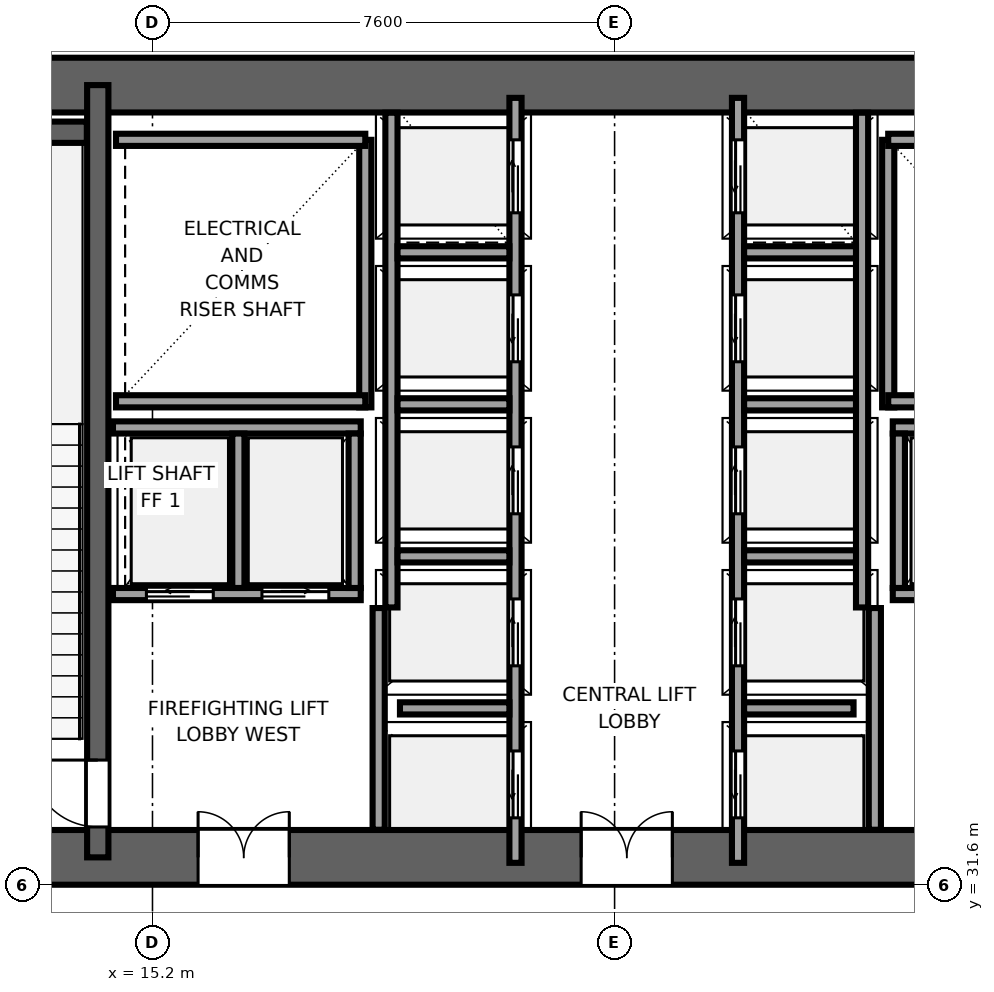
"""IFC4 building model, lengths in metres.
Left out: names, types, materials, properties, quantities, classifications, styles, units other than length and angle.
Written with IfcOpenShell. Run it as: python <this file> out.ifc"""

import sys

from ifc_helpers import new_model, si_unit, direction, frame, frame_2d, origin, place, context, subcontext, project, spatial, rectangle, extrude, source, transform, mapped, element, fill, save


model = new_model("IFC4")
c1 = context("Model", 3, precision=1e-05, world=origin(), true_north=direction((0.0, 1.0)))
c2 = subcontext(c1, "Body", "Model", "MODEL_VIEW")
j1 = project(units=[si_unit("LENGTHUNIT", "METRE"), si_unit("PLANEANGLEUNIT", "RADIAN")], contexts=[c1])
p1 = place(None, origin())
s1 = spatial("IfcSite", under=j1, at=p1, CompositionType="ELEMENT")
p2 = place(p1, origin())
s2 = spatial("IfcBuilding", under=s1, at=p2, CompositionType="ELEMENT")
p3 = place(p2, origin())
s3 = spatial("IfcBuildingStorey", under=s2, at=p3, CompositionType="ELEMENT", Elevation=0.0)
p4 = place(p3, frame((9.6, 32.05, 0.0), z_axis=(0.0, 0.0, 1.0), x_axis=(1.0, 0.0, 0.0)))
e1 = element("IfcWall", 1, at=p4, inside=s3, PredefinedType="SHEAR", context=c2, shape_type="SweptSolid", body=[
    extrude(rectangle(XDim=26.8, YDim=0.9, at=frame_2d((13.4, 0.0))), origin(), (0.0, 0.0, 1.0), 6.0),
])
p5 = place(p4, frame((7.85, 0.0, 0.0), z_axis=(0.0, 0.0, 1.0), x_axis=(-1.0, 0.0, 0.0)))
e2 = element("IfcOpeningElement", 2, at=p5, cuts=e1, PredefinedType="OPENING", context=c2, shape_type="SweptSolid", body=[
    extrude(rectangle(XDim=1.5, YDim=2.04, at=frame_2d((0.75, 1.02))), frame((0.0, 0.46, 0.0), z_axis=(0.0, -1.0, 0.0), x_axis=(1.0, 0.0, 0.0)), (0.0, 0.0, 1.0), 0.92),
])
p6 = place(p4, frame((14.15, 0.0, 0.0), z_axis=(0.0, 0.0, 1.0), x_axis=(-1.0, 0.0, 0.0)))
e3 = element("IfcOpeningElement", 3, at=p6, cuts=e1, PredefinedType="OPENING", context=c2, shape_type="SweptSolid", body=[
    extrude(rectangle(XDim=1.5, YDim=2.04, at=frame_2d((0.75, 1.02))), frame((0.0, 0.46, 0.0), z_axis=(0.0, -1.0, 0.0), x_axis=(1.0, 0.0, 0.0)), (0.0, 0.0, 1.0), 0.92),
])
p7 = place(p4, frame((20.45, 0.0, 0.0), z_axis=(0.0, 0.0, 1.0), x_axis=(-1.0, 0.0, 0.0)))
e4 = element("IfcOpeningElement", 4, at=p7, cuts=e1, PredefinedType="OPENING", context=c2, shape_type="SweptSolid", body=[
    extrude(rectangle(XDim=1.5, YDim=2.04, at=frame_2d((0.75, 1.02))), frame((0.0, 0.46, 0.0), z_axis=(0.0, -1.0, 0.0), x_axis=(1.0, 0.0, 0.0)), (0.0, 0.0, 1.0), 0.92),
])
p8 = place(p3, frame((9.6, 44.75, 0.0), z_axis=(0.0, 0.0, 1.0), x_axis=(1.0, 0.0, 0.0)))
e5 = element("IfcWall", 5, at=p8, inside=s3, PredefinedType="SHEAR", context=c2, shape_type="SweptSolid", body=[
    extrude(rectangle(XDim=26.8, YDim=0.9, at=frame_2d((13.4, 0.0))), origin(), (0.0, 0.0, 1.0), 6.0),
])
p9 = place(p3, frame((14.3, 32.05, 0.0), z_axis=(0.0, 0.0, 1.0), x_axis=(0.0, 1.0, 0.0)))
e6 = element("IfcWall", 6, at=p9, inside=s3, PredefinedType="SHEAR", context=c2, shape_type="SweptSolid", body=[
    extrude(rectangle(XDim=12.7, YDim=0.35, at=frame_2d((6.35, 0.0))), origin(), (0.0, 0.0, 1.0), 6.0),
])
p10 = place(p9, frame((1.6, 0.0, 0.0), z_axis=(0.0, 0.0, 1.0), x_axis=(-1.0, 0.0, 0.0)))
e7 = element("IfcOpeningElement", 7, at=p10, cuts=e6, PredefinedType="OPENING", context=c2, shape_type="SweptSolid", body=[
    extrude(rectangle(XDim=1.1, YDim=2.12, at=frame_2d((0.55, 1.06))), frame((0.0, 0.185, 0.0), z_axis=(0.0, -1.0, 0.0), x_axis=(1.0, 0.0, 0.0)), (0.0, 0.0, 1.0), 0.37),
])
p11 = place(p3, frame((10.52, 43.975, 0.0), z_axis=(0.0, 0.0, 1.0), x_axis=(1.0, 0.0, 0.0)))
e8 = element("IfcWall", 8, at=p11, inside=s3, PredefinedType="SHEAR", context=c2, shape_type="SweptSolid", body=[
    extrude(rectangle(XDim=3.6, YDim=0.35, at=frame_2d((1.8, 0.0))), origin(), (0.0, 0.0, 1.0), 6.0),
])
p12 = place(p3, frame((18.7, 39.45, 0.0), z_axis=(0.0, 0.0, 1.0), x_axis=(0.0, 1.0, 0.0)))
e9 = element("IfcWall", 9, at=p12, inside=s3, PredefinedType="SOLIDWALL", context=c2, shape_type="SweptSolid", body=[
    extrude(rectangle(XDim=4.4, YDim=0.2, at=frame_2d((2.2, 0.0))), origin(), (0.0, 0.0, 1.0), 5.74),
])
for number, where, z_axis, x_axis in (
    (10, (14.6, 39.55, 0.0), (0.0, 0.0, 1.0), (1.0, 0.0, 0.0)),
    (11, (14.6, 43.85, 0.0), (0.0, 0.0, 1.0), (1.0, 0.0, 0.0)),
):
    element("IfcWall", number, at=place(p3, frame(where, z_axis=z_axis, x_axis=x_axis)), inside=s3, PredefinedType="SOLIDWALL", context=c2, shape_type="SweptSolid", body=[
        extrude(rectangle(XDim=4.1, YDim=0.2, at=frame_2d((2.05, 0.0))), origin(), (0.0, 0.0, 1.0), 5.74),
    ])
p13 = place(p3, frame((27.3, 39.45, 0.0), z_axis=(0.0, 0.0, 1.0), x_axis=(0.0, 1.0, 0.0)))
e12 = element("IfcWall", 12, at=p13, inside=s3, PredefinedType="SOLIDWALL", context=c2, shape_type="SweptSolid", body=[
    extrude(rectangle(XDim=4.4, YDim=0.2, at=frame_2d((2.2, 0.0))), origin(), (0.0, 0.0, 1.0), 5.74),
])
for number, where, z_axis, x_axis in (
    (13, (27.3, 39.55, 0.0), (0.0, 0.0, 1.0), (1.0, 0.0, 0.0)),
    (14, (27.3, 43.85, 0.0), (0.0, 0.0, 1.0), (1.0, 0.0, 0.0)),
):
    element("IfcWall", number, at=place(p3, frame(where, z_axis=z_axis, x_axis=x_axis)), inside=s3, PredefinedType="SOLIDWALL", context=c2, shape_type="SweptSolid", body=[
        extrude(rectangle(XDim=4.1, YDim=0.2, at=frame_2d((2.05, 0.0))), origin(), (0.0, 0.0, 1.0), 5.74),
    ])
for number, where, z_axis, x_axis in (
    (15, (18.92, 32.504, 0.0), (0.0, 0.0, 1.0), (0.0, 1.0, 0.0)),
    (16, (27.08, 32.504, 0.0), (0.0, 0.0, 1.0), (0.0, 1.0, 0.0)),
):
    element("IfcWall", number, at=place(p3, frame(where, z_axis=z_axis, x_axis=x_axis)), inside=s3, PredefinedType="SOLIDWALL", context=c2, shape_type="SweptSolid", body=[
        extrude(rectangle(XDim=3.646, YDim=0.2, at=frame_2d((1.823, 0.0))), origin(), (0.0, 0.0, 1.0), 5.74),
    ])
p14 = place(p3, frame((21.17, 31.96, 0.0), z_axis=(0.0, 0.0, 1.0), x_axis=(0.0, 1.0, 0.0)))
e17 = element("IfcWall", 17, at=p14, inside=s3, PredefinedType="SOLIDWALL", context=c2, shape_type="SweptSolid", body=[
    extrude(rectangle(XDim=12.58, YDim=0.2, at=frame_2d((6.29, 0.0))), origin(), (0.0, 0.0, 1.0), 5.74),
])
p15 = place(p14, frame((0.74, 0.0, 0.0)))
e18 = element("IfcOpeningElement", 18, at=p15, cuts=e17, PredefinedType="OPENING", context=c2, shape_type="SweptSolid", body=[
    extrude(rectangle(XDim=1.1, YDim=2.12, at=frame_2d((0.55, 1.06))), frame((0.0, 0.11, 0.0), z_axis=(0.0, -1.0, 0.0), x_axis=(1.0, 0.0, 0.0)), (0.0, 0.0, 1.0), 0.22),
])
p16 = place(p14, frame((3.24, 0.0, 0.0)))
e19 = element("IfcOpeningElement", 19, at=p16, cuts=e17, PredefinedType="OPENING", context=c2, shape_type="SweptSolid", body=[
    extrude(rectangle(XDim=1.1, YDim=2.12, at=frame_2d((0.55, 1.06))), frame((0.0, 0.11, 0.0), z_axis=(0.0, -1.0, 0.0), x_axis=(1.0, 0.0, 0.0)), (0.0, 0.0, 1.0), 0.22),
])
p17 = place(p14, frame((5.74, 0.0, 0.0)))
e20 = element("IfcOpeningElement", 20, at=p17, cuts=e17, PredefinedType="OPENING", context=c2, shape_type="SweptSolid", body=[
    extrude(rectangle(XDim=1.1, YDim=2.12, at=frame_2d((0.55, 1.06))), frame((0.0, 0.11, 0.0), z_axis=(0.0, -1.0, 0.0), x_axis=(1.0, 0.0, 0.0)), (0.0, 0.0, 1.0), 0.22),
])
p18 = place(p14, frame((8.24, 0.0, 0.0)))
e21 = element("IfcOpeningElement", 21, at=p18, cuts=e17, PredefinedType="OPENING", context=c2, shape_type="SweptSolid", body=[
    extrude(rectangle(XDim=1.1, YDim=2.12, at=frame_2d((0.55, 1.06))), frame((0.0, 0.11, 0.0), z_axis=(0.0, -1.0, 0.0), x_axis=(1.0, 0.0, 0.0)), (0.0, 0.0, 1.0), 0.22),
])
p19 = place(p14, frame((10.69, 0.0, 0.0)))
e22 = element("IfcOpeningElement", 22, at=p19, cuts=e17, PredefinedType="OPENING", context=c2, shape_type="SweptSolid", body=[
    extrude(rectangle(XDim=1.2, YDim=2.15, at=frame_2d((0.6, 1.075))), frame((0.0, 0.11, 0.0), z_axis=(0.0, -1.0, 0.0), x_axis=(1.0, 0.0, 0.0)), (0.0, 0.0, 1.0), 0.22),
])
p20 = place(p3, frame((19.13, 36.16, 0.0), z_axis=(0.0, 0.0, 1.0), x_axis=(0.0, 1.0, 0.0)))
e23 = element("IfcWall", 23, at=p20, inside=s3, PredefinedType="SOLIDWALL", context=c2, shape_type="SweptSolid", body=[
    extrude(rectangle(XDim=8.136, YDim=0.2, at=frame_2d((4.068, 0.0))), origin(), (0.0, 0.0, 1.0), 5.74),
])
p21 = place(p3, frame((19.27, 34.5, 0.0), z_axis=(0.0, 0.0, 1.0), x_axis=(1.0, 0.0, 0.0)))
e24 = element("IfcWall", 24, at=p21, inside=s3, PredefinedType="SOLIDWALL", context=c2, shape_type="SweptSolid", body=[
    extrude(rectangle(XDim=1.8, YDim=0.2, at=frame_2d((0.9, 0.0))), origin(), (0.0, 0.0, 1.0), 5.74),
])
for number, where, z_axis, x_axis in (
    (25, (19.23, 37.0, 0.0), (0.0, 0.0, 1.0), (1.0, 0.0, 0.0)),
    (26, (19.23, 39.5, 0.0), (0.0, 0.0, 1.0), (1.0, 0.0, 0.0)),
    (27, (19.23, 42.0, 0.0), (0.0, 0.0, 1.0), (1.0, 0.0, 0.0)),
):
    element("IfcWall", number, at=place(p3, frame(where, z_axis=z_axis, x_axis=x_axis)), inside=s3, PredefinedType="SOLIDWALL", context=c2, shape_type="SweptSolid", body=[
        extrude(rectangle(XDim=1.84, YDim=0.2, at=frame_2d((0.92, 0.0))), origin(), (0.0, 0.0, 1.0), 5.74),
    ])
p22 = place(p3, frame((27.375, 36.38, 0.0), z_axis=(0.0, 0.0, 1.0), x_axis=(1.0, 0.0, 0.0)))
e28 = element("IfcWall", 28, at=p22, inside=s3, PredefinedType="SOLIDWALL", context=c2, shape_type="SweptSolid", body=[
    extrude(rectangle(XDim=4.075, YDim=0.2, at=frame_2d((2.038, 0.0))), origin(), (0.0, 0.0, 1.0), 5.74),
])
p23 = place(p22, frame((0.525, 0.0, 0.0)))
e29 = element("IfcOpeningElement", 29, at=p23, cuts=e28, PredefinedType="OPENING", context=c2, shape_type="SweptSolid", body=[
    extrude(rectangle(XDim=1.1, YDim=2.12, at=frame_2d((0.55, 1.06))), frame((0.0, 0.11, 0.0), z_axis=(0.0, -1.0, 0.0), x_axis=(1.0, 0.0, 0.0)), (0.0, 0.0, 1.0), 0.22),
])
p24 = place(p22, frame((2.425, 0.0, 0.0)))
e30 = element("IfcOpeningElement", 30, at=p24, cuts=e28, PredefinedType="OPENING", context=c2, shape_type="SweptSolid", body=[
    extrude(rectangle(XDim=1.1, YDim=2.12, at=frame_2d((0.55, 1.06))), frame((0.0, 0.11, 0.0), z_axis=(0.0, -1.0, 0.0), x_axis=(1.0, 0.0, 0.0)), (0.0, 0.0, 1.0), 0.22),
])
p25 = place(p3, frame((27.375, 39.12, 0.0), z_axis=(0.0, 0.0, 1.0), x_axis=(1.0, 0.0, 0.0)))
e31 = element("IfcWall", 31, at=p25, inside=s3, PredefinedType="SOLIDWALL", context=c2, shape_type="SweptSolid", body=[
    extrude(rectangle(XDim=4.075, YDim=0.2, at=frame_2d((2.038, 0.0))), origin(), (0.0, 0.0, 1.0), 5.74),
])
p26 = place(p3, frame((27.475, 36.48, 0.0), z_axis=(0.0, 0.0, 1.0), x_axis=(0.0, 1.0, 0.0)))
e32 = element("IfcWall", 32, at=p26, inside=s3, PredefinedType="SOLIDWALL", context=c2, shape_type="SweptSolid", body=[
    extrude(rectangle(XDim=2.54, YDim=0.2, at=frame_2d((1.27, 0.0))), origin(), (0.0, 0.0, 1.0), 5.74),
])
p27 = place(p3, frame((14.55, 36.38, 0.0), z_axis=(0.0, 0.0, 1.0), x_axis=(1.0, 0.0, 0.0)))
e33 = element("IfcWall", 33, at=p27, inside=s3, PredefinedType="SOLIDWALL", context=c2, shape_type="SweptSolid", body=[
    extrude(rectangle(XDim=4.075, YDim=0.2, at=frame_2d((2.038, 0.0))), origin(), (0.0, 0.0, 1.0), 5.74),
])
p28 = place(p27, frame((0.55, 0.0, 0.0)))
e34 = element("IfcOpeningElement", 34, at=p28, cuts=e33, PredefinedType="OPENING", context=c2, shape_type="SweptSolid", body=[
    extrude(rectangle(XDim=1.1, YDim=2.12, at=frame_2d((0.55, 1.06))), frame((0.0, 0.11, 0.0), z_axis=(0.0, -1.0, 0.0), x_axis=(1.0, 0.0, 0.0)), (0.0, 0.0, 1.0), 0.22),
])
p29 = place(p27, frame((2.45, 0.0, 0.0)))
e35 = element("IfcOpeningElement", 35, at=p29, cuts=e33, PredefinedType="OPENING", context=c2, shape_type="SweptSolid", body=[
    extrude(rectangle(XDim=1.1, YDim=2.12, at=frame_2d((0.55, 1.06))), frame((0.0, 0.11, 0.0), z_axis=(0.0, -1.0, 0.0), x_axis=(1.0, 0.0, 0.0)), (0.0, 0.0, 1.0), 0.22),
])
p30 = place(p3, frame((14.55, 39.12, 0.0), z_axis=(0.0, 0.0, 1.0), x_axis=(1.0, 0.0, 0.0)))
e36 = element("IfcWall", 36, at=p30, inside=s3, PredefinedType="SOLIDWALL", context=c2, shape_type="SweptSolid", body=[
    extrude(rectangle(XDim=4.075, YDim=0.2, at=frame_2d((2.038, 0.0))), origin(), (0.0, 0.0, 1.0), 5.74),
])
for number, where, z_axis, x_axis in (
    (37, (18.525, 36.48, 0.0), (0.0, 0.0, 1.0), (0.0, 1.0, 0.0)),
    (38, (16.613, 36.48, 0.0), (0.0, 0.0, 1.0), (0.0, 1.0, 0.0)),
):
    element("IfcWall", number, at=place(p3, frame(where, z_axis=z_axis, x_axis=x_axis)), inside=s3, PredefinedType="SOLIDWALL", context=c2, shape_type="SweptSolid", body=[
        extrude(rectangle(XDim=2.54, YDim=0.2, at=frame_2d((1.27, 0.0))), origin(), (0.0, 0.0, 1.0), 5.74),
    ])
p31 = place(p3, frame((24.83, 31.96, 0.0), z_axis=(0.0, 0.0, 1.0), x_axis=(0.0, 1.0, 0.0)))
e39 = element("IfcWall", 39, at=p31, inside=s3, PredefinedType="SOLIDWALL", context=c2, shape_type="SweptSolid", body=[
    extrude(rectangle(XDim=12.58, YDim=0.2, at=frame_2d((6.29, 0.0))), origin(), (0.0, 0.0, 1.0), 5.74),
])
p32 = place(p31, frame((0.74, 0.0, 0.0)))
e40 = element("IfcOpeningElement", 40, at=p32, cuts=e39, PredefinedType="OPENING", context=c2, shape_type="SweptSolid", body=[
    extrude(rectangle(XDim=1.1, YDim=2.12, at=frame_2d((0.55, 1.06))), frame((0.0, 0.11, 0.0), z_axis=(0.0, -1.0, 0.0), x_axis=(1.0, 0.0, 0.0)), (0.0, 0.0, 1.0), 0.22),
])
p33 = place(p31, frame((3.24, 0.0, 0.0)))
e41 = element("IfcOpeningElement", 41, at=p33, cuts=e39, PredefinedType="OPENING", context=c2, shape_type="SweptSolid", body=[
    extrude(rectangle(XDim=1.1, YDim=2.12, at=frame_2d((0.55, 1.06))), frame((0.0, 0.11, 0.0), z_axis=(0.0, -1.0, 0.0), x_axis=(1.0, 0.0, 0.0)), (0.0, 0.0, 1.0), 0.22),
])
p34 = place(p31, frame((5.74, 0.0, 0.0)))
e42 = element("IfcOpeningElement", 42, at=p34, cuts=e39, PredefinedType="OPENING", context=c2, shape_type="SweptSolid", body=[
    extrude(rectangle(XDim=1.1, YDim=2.12, at=frame_2d((0.55, 1.06))), frame((0.0, 0.11, 0.0), z_axis=(0.0, -1.0, 0.0), x_axis=(1.0, 0.0, 0.0)), (0.0, 0.0, 1.0), 0.22),
])
p35 = place(p31, frame((8.24, 0.0, 0.0)))
e43 = element("IfcOpeningElement", 43, at=p35, cuts=e39, PredefinedType="OPENING", context=c2, shape_type="SweptSolid", body=[
    extrude(rectangle(XDim=1.1, YDim=2.12, at=frame_2d((0.55, 1.06))), frame((0.0, 0.11, 0.0), z_axis=(0.0, -1.0, 0.0), x_axis=(1.0, 0.0, 0.0)), (0.0, 0.0, 1.0), 0.22),
])
p36 = place(p31, frame((10.69, 0.0, 0.0)))
e44 = element("IfcOpeningElement", 44, at=p36, cuts=e39, PredefinedType="OPENING", context=c2, shape_type="SweptSolid", body=[
    extrude(rectangle(XDim=1.2, YDim=2.15, at=frame_2d((0.6, 1.075))), frame((0.0, 0.11, 0.0), z_axis=(0.0, -1.0, 0.0), x_axis=(1.0, 0.0, 0.0)), (0.0, 0.0, 1.0), 0.22),
])
p37 = place(p3, frame((26.87, 36.16, 0.0), z_axis=(0.0, 0.0, 1.0), x_axis=(0.0, 1.0, 0.0)))
e45 = element("IfcWall", 45, at=p37, inside=s3, PredefinedType="SOLIDWALL", context=c2, shape_type="SweptSolid", body=[
    extrude(rectangle(XDim=8.136, YDim=0.2, at=frame_2d((4.068, 0.0))), origin(), (0.0, 0.0, 1.0), 5.74),
])
p38 = place(p3, frame((24.93, 34.5, 0.0), z_axis=(0.0, 0.0, 1.0), x_axis=(1.0, 0.0, 0.0)))
e46 = element("IfcWall", 46, at=p38, inside=s3, PredefinedType="SOLIDWALL", context=c2, shape_type="SweptSolid", body=[
    extrude(rectangle(XDim=1.8, YDim=0.2, at=frame_2d((0.9, 0.0))), origin(), (0.0, 0.0, 1.0), 5.74),
])
for number, where, z_axis, x_axis in (
    (47, (24.93, 37.0, 0.0), (0.0, 0.0, 1.0), (1.0, 0.0, 0.0)),
    (48, (24.93, 39.5, 0.0), (0.0, 0.0, 1.0), (1.0, 0.0, 0.0)),
    (49, (24.93, 42.0, 0.0), (0.0, 0.0, 1.0), (1.0, 0.0, 0.0)),
):
    element("IfcWall", number, at=place(p3, frame(where, z_axis=z_axis, x_axis=x_axis)), inside=s3, PredefinedType="SOLIDWALL", context=c2, shape_type="SweptSolid", body=[
        extrude(rectangle(XDim=1.84, YDim=0.2, at=frame_2d((0.92, 0.0))), origin(), (0.0, 0.0, 1.0), 5.74),
    ])
m1 = source(origin(), c2, "Body", "SweptSolid", [
    extrude(rectangle(XDim=1.1, YDim=2.12, at=frame_2d((0.55, 1.06))), frame((0.0, 0.025, 0.0), z_axis=(0.0, -1.0, 0.0), x_axis=(1.0, 0.0, 0.0)), (0.0, 0.0, 1.0), 0.05),
])
p39 = place(p10, origin())
e50 = element("IfcDoor", 50, at=p39, inside=s3, OperationType="SINGLE_SWING_RIGHT", PredefinedType="DOOR", context=c2, shape_type="MappedRepresentation", body=[
    mapped(m1, transform((0.0, 0.0, 0.0), x_axis=(1.0, 0.0, 0.0), y_axis=(0.0, 1.0, 0.0), z_axis=(0.0, 0.0, 1.0), scale=1.0)),
])
fill(e7, e50)
m2 = source(origin(), c2, "Body", "SweptSolid", [
    extrude(rectangle(XDim=1.5, YDim=2.04, at=frame_2d((0.75, 1.02))), frame((0.0, 0.025, 0.0), z_axis=(0.0, -1.0, 0.0), x_axis=(1.0, 0.0, 0.0)), (0.0, 0.0, 1.0), 0.05),
])
p40 = place(p5, origin())
e51 = element("IfcDoor", 51, at=p40, inside=s3, OperationType="DOUBLE_DOOR_SINGLE_SWING", PredefinedType="DOOR", context=c2, shape_type="MappedRepresentation", body=[
    mapped(m2, transform((0.0, 0.0, 0.0), x_axis=(1.0, 0.0, 0.0), y_axis=(0.0, 1.0, 0.0), z_axis=(0.0, 0.0, 1.0), scale=1.0)),
])
fill(e2, e51)
p41 = place(p6, origin())
e52 = element("IfcDoor", 52, at=p41, inside=s3, OperationType="DOUBLE_DOOR_SINGLE_SWING", PredefinedType="DOOR", context=c2, shape_type="MappedRepresentation", body=[
    mapped(m2, transform((0.0, 0.0, 0.0), x_axis=(1.0, 0.0, 0.0), y_axis=(0.0, 1.0, 0.0), z_axis=(0.0, 0.0, 1.0), scale=1.0)),
])
fill(e3, e52)
m3 = source(origin(), c2, "Body", "SweptSolid", [
    extrude(rectangle(XDim=1.1, YDim=2.12, at=frame_2d((0.55, 1.06))), frame((0.0, 0.025, 0.0), z_axis=(0.0, -1.0, 0.0), x_axis=(1.0, 0.0, 0.0)), (0.0, 0.0, 1.0), 0.05),
])
p42 = place(p15, origin())
e53 = element("IfcDoor", 53, at=p42, inside=s3, OperationType="SLIDING_TO_LEFT", PredefinedType="DOOR", context=c2, shape_type="MappedRepresentation", body=[
    mapped(m3, transform((0.0, 0.0, 0.0), x_axis=(1.0, 0.0, 0.0), y_axis=(0.0, 1.0, 0.0), z_axis=(0.0, 0.0, 1.0), scale=1.0)),
])
fill(e18, e53)
p43 = place(p16, origin())
e54 = element("IfcDoor", 54, at=p43, inside=s3, OperationType="SLIDING_TO_RIGHT", PredefinedType="DOOR", context=c2, shape_type="MappedRepresentation", body=[
    mapped(m3, transform((0.0, 0.0, 0.0), x_axis=(1.0, 0.0, 0.0), y_axis=(0.0, 1.0, 0.0), z_axis=(0.0, 0.0, 1.0), scale=1.0)),
])
fill(e19, e54)
p44 = place(p17, origin())
e55 = element("IfcDoor", 55, at=p44, inside=s3, OperationType="SLIDING_TO_RIGHT", PredefinedType="DOOR", context=c2, shape_type="MappedRepresentation", body=[
    mapped(m3, transform((0.0, 0.0, 0.0), x_axis=(1.0, 0.0, 0.0), y_axis=(0.0, 1.0, 0.0), z_axis=(0.0, 0.0, 1.0), scale=1.0)),
])
fill(e20, e55)
p45 = place(p18, origin())
e56 = element("IfcDoor", 56, at=p45, inside=s3, OperationType="SLIDING_TO_LEFT", PredefinedType="DOOR", context=c2, shape_type="MappedRepresentation", body=[
    mapped(m3, transform((0.0, 0.0, 0.0), x_axis=(1.0, 0.0, 0.0), y_axis=(0.0, 1.0, 0.0), z_axis=(0.0, 0.0, 1.0), scale=1.0)),
])
fill(e21, e56)
m4 = source(origin(), c2, "Body", "SweptSolid", [
    extrude(rectangle(XDim=1.2, YDim=2.15, at=frame_2d((0.6, 1.075))), frame((0.0, 0.025, 0.0), z_axis=(0.0, -1.0, 0.0), x_axis=(1.0, 0.0, 0.0)), (0.0, 0.0, 1.0), 0.05),
])
p46 = place(p19, origin())
e57 = element("IfcDoor", 57, at=p46, inside=s3, OperationType="SLIDING_TO_RIGHT", PredefinedType="DOOR", context=c2, shape_type="MappedRepresentation", body=[
    mapped(m4, transform((0.0, 0.0, 0.0), x_axis=(1.0, 0.0, 0.0), y_axis=(0.0, 1.0, 0.0), z_axis=(0.0, 0.0, 1.0), scale=1.0)),
])
fill(e22, e57)
p47 = place(p28, origin())
e58 = element("IfcDoor", 58, at=p47, inside=s3, OperationType="SLIDING_TO_LEFT", PredefinedType="DOOR", context=c2, shape_type="MappedRepresentation", body=[
    mapped(m3, transform((0.0, 0.0, 0.0), x_axis=(1.0, 0.0, 0.0), y_axis=(0.0, 1.0, 0.0), z_axis=(0.0, 0.0, 1.0), scale=1.0)),
])
fill(e34, e58)
p48 = place(p29, origin())
e59 = element("IfcDoor", 59, at=p48, inside=s3, OperationType="SLIDING_TO_RIGHT", PredefinedType="DOOR", context=c2, shape_type="MappedRepresentation", body=[
    mapped(m3, transform((0.0, 0.0, 0.0), x_axis=(1.0, 0.0, 0.0), y_axis=(0.0, 1.0, 0.0), z_axis=(0.0, 0.0, 1.0), scale=1.0)),
])
fill(e35, e59)
p49 = place(p32, origin())
e60 = element("IfcDoor", 60, at=p49, inside=s3, OperationType="SLIDING_TO_LEFT", PredefinedType="DOOR", context=c2, shape_type="MappedRepresentation", body=[
    mapped(m3, transform((0.0, 0.0, 0.0), x_axis=(1.0, 0.0, 0.0), y_axis=(0.0, 1.0, 0.0), z_axis=(0.0, 0.0, 1.0), scale=1.0)),
])
fill(e40, e60)
p50 = place(p33, origin())
e61 = element("IfcDoor", 61, at=p50, inside=s3, OperationType="SLIDING_TO_RIGHT", PredefinedType="DOOR", context=c2, shape_type="MappedRepresentation", body=[
    mapped(m3, transform((0.0, 0.0, 0.0), x_axis=(1.0, 0.0, 0.0), y_axis=(0.0, 1.0, 0.0), z_axis=(0.0, 0.0, 1.0), scale=1.0)),
])
fill(e41, e61)
p51 = place(p34, origin())
e62 = element("IfcDoor", 62, at=p51, inside=s3, OperationType="SLIDING_TO_RIGHT", PredefinedType="DOOR", context=c2, shape_type="MappedRepresentation", body=[
    mapped(m3, transform((0.0, 0.0, 0.0), x_axis=(1.0, 0.0, 0.0), y_axis=(0.0, 1.0, 0.0), z_axis=(0.0, 0.0, 1.0), scale=1.0)),
])
fill(e42, e62)
p52 = place(p35, origin())
e63 = element("IfcDoor", 63, at=p52, inside=s3, OperationType="SLIDING_TO_LEFT", PredefinedType="DOOR", context=c2, shape_type="MappedRepresentation", body=[
    mapped(m3, transform((0.0, 0.0, 0.0), x_axis=(1.0, 0.0, 0.0), y_axis=(0.0, 1.0, 0.0), z_axis=(0.0, 0.0, 1.0), scale=1.0)),
])
fill(e43, e63)
p53 = place(p36, origin())
e64 = element("IfcDoor", 64, at=p53, inside=s3, OperationType="SLIDING_TO_LEFT", PredefinedType="DOOR", context=c2, shape_type="MappedRepresentation", body=[
    mapped(m4, transform((0.0, 0.0, 0.0), x_axis=(1.0, 0.0, 0.0), y_axis=(0.0, 1.0, 0.0), z_axis=(0.0, 0.0, 1.0), scale=1.0)),
])
fill(e44, e64)
save(model, sys.argv[1])
